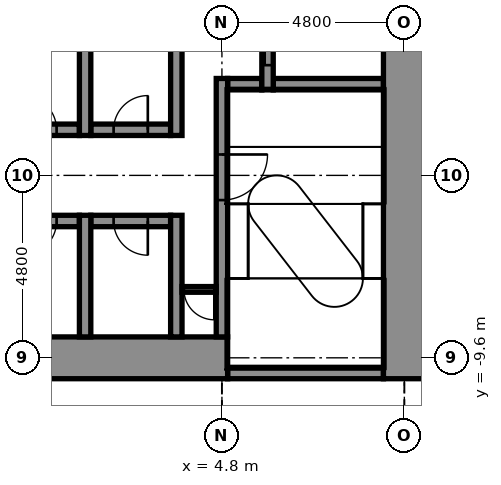
"""IFC4 building model, lengths in metres.
Left out: names, types, materials, properties, quantities, classifications, styles, units other than length and angle.
Written with IfcOpenShell. Run it as: python <this file> out.ifc"""

import sys

from ifc_helpers import new_model, si_unit, direction, frame, frame_2d, origin, place, context, subcontext, project, spatial, rectangle, extrude, element, fill, save


model = new_model("IFC4")
c1 = context("Model", 3, precision=1e-05, world=origin(), true_north=direction((0.0, 1.0)))
c2 = subcontext(c1, "Body", "Model", "MODEL_VIEW")
j1 = project(units=[si_unit("LENGTHUNIT", "METRE"), si_unit("PLANEANGLEUNIT", "RADIAN")], contexts=[c1])
p1 = place(None, origin())
s1 = spatial("IfcSite", under=j1, at=p1, CompositionType="ELEMENT")
p2 = place(p1, origin())
s2 = spatial("IfcBuilding", under=s1, at=p2, CompositionType="ELEMENT")
p3 = place(p2, frame((0.0, 0.0, 22.4)))
s3 = spatial("IfcBuildingStorey", under=s2, at=p3, CompositionType="ELEMENT", Elevation=22.4)
p4 = place(p3, frame((4.95, -10.0, -0.25), z_axis=(0.0, 0.0, 1.0), x_axis=(1.0, 0.0, 0.0)))
e1 = element("IfcWall", 1, at=p4, inside=s3, PredefinedType="STANDARD", context=c2, shape_type="SweptSolid", body=[
    extrude(rectangle(XDim=4.1, YDim=0.3, at=frame_2d((2.05, 0.0))), origin(), (0.0, 0.0, 1.0), 5.5),
])
p5 = place(p3, frame((-5.25, -9.6, -0.25), z_axis=(0.0, 0.0, 1.0), x_axis=(1.0, 0.0, 0.0)))
e2 = element("IfcWall", 2, at=p5, inside=s3, PredefinedType="SHEAR", context=c2, shape_type="SweptSolid", body=[
    extrude(rectangle(XDim=10.2, YDim=1.1, at=frame_2d((5.1, 0.0))), origin(), (0.0, 0.0, 1.0), 5.5),
])
p6 = place(p5, frame((0.6, 0.0, 0.25)))
e3 = element("IfcOpeningElement", 3, at=p6, cuts=e2, PredefinedType="OPENING", context=c2, shape_type="SweptSolid", body=[
    extrude(rectangle(XDim=0.9, YDim=2.1, at=frame_2d((0.45, 1.05))), frame((0.0, 0.56, 0.0), z_axis=(0.0, -1.0, 0.0), x_axis=(1.0, 0.0, 0.0)), (0.0, 0.0, 1.0), 1.12),
])
p7 = place(p3, frame((-1.05, -6.0, -0.25), z_axis=(0.0, 0.0, 1.0), x_axis=(1.0, 0.0, 0.0)))
e4 = element("IfcWall", 4, at=p7, inside=s3, PredefinedType="STANDARD", context=c2, shape_type="SweptSolid", body=[
    extrude(rectangle(XDim=2.1, YDim=0.3, at=frame_2d((1.05, 0.0))), origin(), (0.0, 0.0, 1.0), 5.5),
])
p8 = place(p7, frame((0.6, 0.0, 0.25)))
e5 = element("IfcOpeningElement", 5, at=p8, cuts=e4, PredefinedType="OPENING", context=c2, shape_type="SweptSolid", body=[
    extrude(rectangle(XDim=0.9, YDim=2.1, at=frame_2d((0.45, 1.05))), frame((0.0, 0.16, 0.0), z_axis=(0.0, -1.0, 0.0), x_axis=(1.0, 0.0, 0.0)), (0.0, 0.0, 1.0), 0.32),
])
p9 = place(p3, frame((1.35, -6.0, -0.25), z_axis=(0.0, 0.0, 1.0), x_axis=(1.0, 0.0, 0.0)))
e6 = element("IfcWall", 6, at=p9, inside=s3, PredefinedType="STANDARD", context=c2, shape_type="SweptSolid", body=[
    extrude(rectangle(XDim=2.1, YDim=0.3, at=frame_2d((1.05, 0.0))), origin(), (0.0, 0.0, 1.0), 5.5),
])
p10 = place(p9, frame((0.6, 0.0, 0.25)))
e7 = element("IfcOpeningElement", 7, at=p10, cuts=e6, PredefinedType="OPENING", context=c2, shape_type="SweptSolid", body=[
    extrude(rectangle(XDim=0.9, YDim=2.1, at=frame_2d((0.45, 1.05))), frame((0.0, 0.16, 0.0), z_axis=(0.0, -1.0, 0.0), x_axis=(1.0, 0.0, 0.0)), (0.0, 0.0, 1.0), 0.32),
])
p11 = place(p3, frame((-1.05, -3.6, -0.25), z_axis=(0.0, 0.0, 1.0), x_axis=(1.0, 0.0, 0.0)))
e8 = element("IfcWall", 8, at=p11, inside=s3, PredefinedType="STANDARD", context=c2, shape_type="SweptSolid", body=[
    extrude(rectangle(XDim=2.1, YDim=0.3, at=frame_2d((1.05, 0.0))), origin(), (0.0, 0.0, 1.0), 5.5),
])
p12 = place(p11, frame((0.6, 0.0, 0.25)))
e9 = element("IfcOpeningElement", 9, at=p12, cuts=e8, PredefinedType="OPENING", context=c2, shape_type="SweptSolid", body=[
    extrude(rectangle(XDim=0.9, YDim=2.1, at=frame_2d((0.45, 1.05))), frame((0.0, 0.16, 0.0), z_axis=(0.0, -1.0, 0.0), x_axis=(1.0, 0.0, 0.0)), (0.0, 0.0, 1.0), 0.32),
])
p13 = place(p3, frame((1.35, -3.6, -0.25), z_axis=(0.0, 0.0, 1.0), x_axis=(1.0, 0.0, 0.0)))
e10 = element("IfcWall", 10, at=p13, inside=s3, PredefinedType="STANDARD", context=c2, shape_type="SweptSolid", body=[
    extrude(rectangle(XDim=2.1, YDim=0.3, at=frame_2d((1.05, 0.0))), origin(), (0.0, 0.0, 1.0), 5.5),
])
p14 = place(p13, frame((0.6, 0.0, 0.25)))
e11 = element("IfcOpeningElement", 11, at=p14, cuts=e10, PredefinedType="OPENING", context=c2, shape_type="SweptSolid", body=[
    extrude(rectangle(XDim=0.9, YDim=2.1, at=frame_2d((0.45, 1.05))), frame((0.0, 0.16, 0.0), z_axis=(0.0, -1.0, 0.0), x_axis=(1.0, 0.0, 0.0)), (0.0, 0.0, 1.0), 0.32),
])
p15 = place(p3, frame((4.95, -2.4, -0.25), z_axis=(0.0, 0.0, 1.0), x_axis=(1.0, 0.0, 0.0)))
e12 = element("IfcWall", 12, at=p15, inside=s3, PredefinedType="STANDARD", context=c2, shape_type="SweptSolid", body=[
    extrude(rectangle(XDim=0.9, YDim=0.3, at=frame_2d((0.45, 0.0))), origin(), (0.0, 0.0, 1.0), 5.5),
])
p16 = place(p3, frame((6.15, -2.4, -0.25), z_axis=(0.0, 0.0, 1.0), x_axis=(1.0, 0.0, 0.0)))
e13 = element("IfcWall", 13, at=p16, inside=s3, PredefinedType="STANDARD", context=c2, shape_type="SweptSolid", body=[
    extrude(rectangle(XDim=2.9, YDim=0.3, at=frame_2d((1.45, 0.0))), origin(), (0.0, 0.0, 1.0), 5.5),
])
p17 = place(p3, frame((1.2, -9.05, -0.25), z_axis=(0.0, 0.0, 1.0), x_axis=(0.0, 1.0, 0.0)))
e14 = element("IfcWall", 14, at=p17, inside=s3, PredefinedType="STANDARD", context=c2, shape_type="SweptSolid", body=[
    extrude(rectangle(XDim=3.2, YDim=0.3, at=frame_2d((1.6, 0.0))), origin(), (0.0, 0.0, 1.0), 5.5),
])
p18 = place(p3, frame((1.2, -3.75, -0.25), z_axis=(0.0, 0.0, 1.0), x_axis=(0.0, 1.0, 0.0)))
e15 = element("IfcWall", 15, at=p18, inside=s3, PredefinedType="STANDARD", context=c2, shape_type="SweptSolid", body=[
    extrude(rectangle(XDim=7.5, YDim=0.3, at=frame_2d((3.75, 0.0))), origin(), (0.0, 0.0, 1.0), 5.5),
])
p19 = place(p3, frame((3.6, -9.05, -0.25), z_axis=(0.0, 0.0, 1.0), x_axis=(0.0, 1.0, 0.0)))
e16 = element("IfcWall", 16, at=p19, inside=s3, PredefinedType="STANDARD", context=c2, shape_type="SweptSolid", body=[
    extrude(rectangle(XDim=3.2, YDim=0.3, at=frame_2d((1.6, 0.0))), origin(), (0.0, 0.0, 1.0), 5.5),
])
p20 = place(p3, frame((3.6, -3.75, -0.25), z_axis=(0.0, 0.0, 1.0), x_axis=(0.0, 1.0, 0.0)))
e17 = element("IfcWall", 17, at=p20, inside=s3, PredefinedType="STANDARD", context=c2, shape_type="SweptSolid", body=[
    extrude(rectangle(XDim=7.5, YDim=0.3, at=frame_2d((3.75, 0.0))), origin(), (0.0, 0.0, 1.0), 5.5),
])
p21 = place(p3, frame((4.8, -9.05, -0.25), z_axis=(0.0, 0.0, 1.0), x_axis=(0.0, 1.0, 0.0)))
e18 = element("IfcWall", 18, at=p21, inside=s3, PredefinedType="STANDARD", context=c2, shape_type="SweptSolid", body=[
    extrude(rectangle(XDim=6.8, YDim=0.3, at=frame_2d((3.4, 0.0))), origin(), (0.0, 0.0, 1.0), 5.5),
])
p22 = place(p21, frame((3.6, 0.0, 0.25)))
e19 = element("IfcOpeningElement", 19, at=p22, cuts=e18, PredefinedType="OPENING", context=c2, shape_type="SweptSolid", body=[
    extrude(rectangle(XDim=1.2, YDim=2.1, at=frame_2d((0.6, 1.05))), frame((0.0, 0.16, 0.0), z_axis=(0.0, -1.0, 0.0), x_axis=(1.0, 0.0, 0.0)), (0.0, 0.0, 1.0), 0.32),
])
p23 = place(p3, frame((6.0, -2.55, -0.25), z_axis=(0.0, 0.0, 1.0), x_axis=(0.0, 1.0, 0.0)))
e20 = element("IfcWall", 20, at=p23, inside=s3, PredefinedType="STANDARD", context=c2, shape_type="SweptSolid", body=[
    extrude(rectangle(XDim=7.5, YDim=0.3, at=frame_2d((3.75, 0.0))), origin(), (0.0, 0.0, 1.0), 5.5),
])
p24 = place(p23, frame((0.65, 0.0, 0.25)))
e21 = element("IfcOpeningElement", 21, at=p24, cuts=e20, PredefinedType="OPENING", context=c2, shape_type="SweptSolid", body=[
    extrude(rectangle(XDim=1.4, YDim=2.1, at=frame_2d((0.7, 1.05))), frame((0.0, 0.16, 0.0), z_axis=(0.0, -1.0, 0.0), x_axis=(1.0, 0.0, 0.0)), (0.0, 0.0, 1.0), 0.32),
])
p25 = place(p23, frame((3.05, 0.0, 0.25)))
e22 = element("IfcOpeningElement", 22, at=p25, cuts=e20, PredefinedType="OPENING", context=c2, shape_type="SweptSolid", body=[
    extrude(rectangle(XDim=1.4, YDim=2.1, at=frame_2d((0.7, 1.05))), frame((0.0, 0.16, 0.0), z_axis=(0.0, -1.0, 0.0), x_axis=(1.0, 0.0, 0.0)), (0.0, 0.0, 1.0), 0.32),
])
p26 = place(p23, frame((5.45, 0.0, 0.25)))
e23 = element("IfcOpeningElement", 23, at=p26, cuts=e20, PredefinedType="OPENING", context=c2, shape_type="SweptSolid", body=[
    extrude(rectangle(XDim=1.4, YDim=2.1, at=frame_2d((0.7, 1.05))), frame((0.0, 0.16, 0.0), z_axis=(0.0, -1.0, 0.0), x_axis=(1.0, 0.0, 0.0)), (0.0, 0.0, 1.0), 0.32),
])
p27 = place(p3, frame((9.6, -10.15, -0.25), z_axis=(0.0, 0.0, 1.0), x_axis=(0.0, 1.0, 0.0)))
e24 = element("IfcWall", 24, at=p27, inside=s3, PredefinedType="SHEAR", context=c2, shape_type="SweptSolid", body=[
    extrude(rectangle(XDim=20.3, YDim=1.1, at=frame_2d((10.15, 0.0))), origin(), (0.0, 0.0, 1.0), 5.5),
])
p28 = place(p3, frame((3.75, -7.8, 0.0), z_axis=(0.0, 0.0, 1.0), x_axis=(1.0, 0.0, 0.0)))
e25 = element("IfcWall", 25, at=p28, inside=s3, PredefinedType="PARTITIONING", context=c2, shape_type="SweptSolid", body=[
    extrude(rectangle(XDim=0.9, YDim=0.15, at=frame_2d((0.45, 0.0))), origin(), (0.0, 0.0, 1.0), 5.25),
])
p29 = place(p28, frame((0.05, 0.0, 0.0)))
e26 = element("IfcOpeningElement", 26, at=p29, cuts=e25, PredefinedType="OPENING", context=c2, shape_type="SweptSolid", body=[
    extrude(rectangle(XDim=0.8, YDim=2.1, at=frame_2d((0.4, 1.05))), frame((0.0, 0.085, 0.0), z_axis=(0.0, -1.0, 0.0), x_axis=(1.0, 0.0, 0.0)), (0.0, 0.0, 1.0), 0.17),
])
p30 = place(p29, frame((0.8, 0.0, 0.0), z_axis=(0.0, 0.0, 1.0), x_axis=(-1.0, 0.0, 0.0)))
e27 = element("IfcDoor", 27, at=p30, inside=s3, OperationType="SINGLE_SWING_RIGHT", PredefinedType="DOOR", context=c2, shape_type="SweptSolid", body=[
    extrude(rectangle(XDim=0.8, YDim=2.1, at=frame_2d((0.4, 1.05))), frame((0.0, 0.025, 0.0), z_axis=(0.0, -1.0, 0.0), x_axis=(1.0, 0.0, 0.0)), (0.0, 0.0, 1.0), 0.05),
])
fill(e26, e27)
p31 = place(p24, origin())
e28 = element("IfcDoor", 28, at=p31, inside=s3, OperationType="DOUBLE_DOOR_SLIDING", PredefinedType="DOOR", context=c2, shape_type="SweptSolid", body=[
    extrude(rectangle(XDim=1.4, YDim=2.1, at=frame_2d((0.7, 1.05))), frame((0.0, 0.025, 0.0), z_axis=(0.0, -1.0, 0.0), x_axis=(1.0, 0.0, 0.0)), (0.0, 0.0, 1.0), 0.05),
])
fill(e21, e28)
p32 = place(p22, frame((1.2, 0.0, 0.0), z_axis=(0.0, 0.0, 1.0), x_axis=(-1.0, 0.0, 0.0)))
e29 = element("IfcDoor", 29, at=p32, inside=s3, OperationType="SINGLE_SWING_RIGHT", PredefinedType="DOOR", context=c2, shape_type="SweptSolid", body=[
    extrude(rectangle(XDim=1.2, YDim=2.1, at=frame_2d((0.6, 1.05))), frame((0.0, 0.025, 0.0), z_axis=(0.0, -1.0, 0.0), x_axis=(1.0, 0.0, 0.0)), (0.0, 0.0, 1.0), 0.05),
])
fill(e19, e29)
p33 = place(p12, origin())
e30 = element("IfcDoor", 30, at=p33, inside=s3, OperationType="SINGLE_SWING_LEFT", PredefinedType="DOOR", context=c2, shape_type="SweptSolid", body=[
    extrude(rectangle(XDim=0.9, YDim=2.1, at=frame_2d((0.45, 1.05))), frame((0.0, 0.025, 0.0), z_axis=(0.0, -1.0, 0.0), x_axis=(1.0, 0.0, 0.0)), (0.0, 0.0, 1.0), 0.05),
])
fill(e9, e30)
p34 = place(p14, origin())
e31 = element("IfcDoor", 31, at=p34, inside=s3, OperationType="SINGLE_SWING_RIGHT", PredefinedType="DOOR", context=c2, shape_type="SweptSolid", body=[
    extrude(rectangle(XDim=0.9, YDim=2.1, at=frame_2d((0.45, 1.05))), frame((0.0, 0.025, 0.0), z_axis=(0.0, -1.0, 0.0), x_axis=(1.0, 0.0, 0.0)), (0.0, 0.0, 1.0), 0.05),
])
fill(e11, e31)
p35 = place(p8, frame((0.9, 0.0, 0.0), z_axis=(0.0, 0.0, 1.0), x_axis=(-1.0, 0.0, 0.0)))
e32 = element("IfcDoor", 32, at=p35, inside=s3, OperationType="SINGLE_SWING_LEFT", PredefinedType="DOOR", context=c2, shape_type="SweptSolid", body=[
    extrude(rectangle(XDim=0.9, YDim=2.1, at=frame_2d((0.45, 1.05))), frame((0.0, 0.025, 0.0), z_axis=(0.0, -1.0, 0.0), x_axis=(1.0, 0.0, 0.0)), (0.0, 0.0, 1.0), 0.05),
])
fill(e5, e32)
p36 = place(p10, frame((0.9, 0.0, 0.0), z_axis=(0.0, 0.0, 1.0), x_axis=(-1.0, 0.0, 0.0)))
e33 = element("IfcDoor", 33, at=p36, inside=s3, OperationType="SINGLE_SWING_RIGHT", PredefinedType="DOOR", context=c2, shape_type="SweptSolid", body=[
    extrude(rectangle(XDim=0.9, YDim=2.1, at=frame_2d((0.45, 1.05))), frame((0.0, 0.025, 0.0), z_axis=(0.0, -1.0, 0.0), x_axis=(1.0, 0.0, 0.0)), (0.0, 0.0, 1.0), 0.05),
])
fill(e7, e33)
save(model, sys.argv[1])
